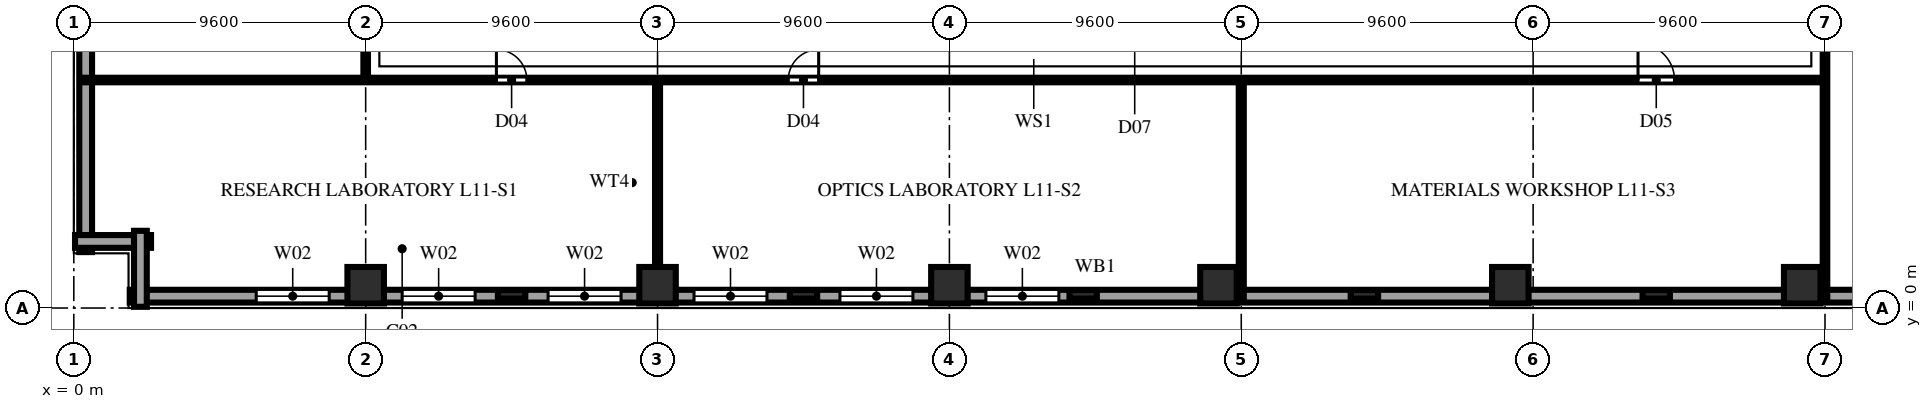
"""IFC4 building model, lengths in metres.
Left out: names, types, materials, properties, quantities, classifications, styles, units other than length and angle.
Written with IfcOpenShell. Run it as: python <this file> out.ifc"""

import sys

from ifc_helpers import new_model, si_unit, direction, frame, frame_2d, origin, origin_2d, place, context, subcontext, project, spatial, rectangle, extrude, element, fill, save


model = new_model("IFC4")
c1 = context("Model", 3, precision=1e-05, world=origin(), true_north=direction((0.0, 1.0)))
c2 = subcontext(c1, "Body", "Model", "MODEL_VIEW")
j1 = project(units=[si_unit("LENGTHUNIT", "METRE"), si_unit("PLANEANGLEUNIT", "RADIAN")], contexts=[c1])
p1 = place(None, origin())
s1 = spatial("IfcSite", under=j1, at=p1, CompositionType="ELEMENT")
p2 = place(p1, origin())
s2 = spatial("IfcBuilding", under=s1, at=p2, CompositionType="ELEMENT")
p3 = place(p2, frame((0.0, 0.0, 47.0)))
s3 = spatial("IfcBuildingStorey", under=s2, at=p3, CompositionType="ELEMENT", Elevation=47.0)
for number, where, z_axis, x_axis in (
    (1, (9.6, 0.75, 0.0), (0.0, 0.0, 1.0), (1.0, 0.0, 0.0)),
    (2, (19.2, 0.75, 0.0), (0.0, 0.0, 1.0), (1.0, 0.0, 0.0)),
    (3, (28.8, 0.75, 0.0), (0.0, 0.0, 1.0), (1.0, 0.0, 0.0)),
    (4, (37.65, 0.75, 0.0), (0.0, 0.0, 1.0), (1.0, 0.0, 0.0)),
    (5, (47.25, 0.75, 0.0), (0.0, 0.0, 1.0), (1.0, 0.0, 0.0)),
    (6, (56.85, 0.75, 0.0), (0.0, 0.0, 1.0), (1.0, 0.0, 0.0)),
):
    element("IfcColumn", number, at=place(p3, frame(where, z_axis=z_axis, x_axis=x_axis)), inside=s3, PredefinedType="COLUMN", context=c2, shape_type="SweptSolid", body=[
        extrude(rectangle(XDim=1.2, YDim=1.2, at=origin_2d()), origin(), (0.0, 0.0, 1.0), 3.8),
    ])
for number, where, z_axis, x_axis in (
    (7, (14.4, 0.45, 0.0), (0.0, 0.0, 1.0), (1.0, 0.0, 0.0)),
    (8, (24.0, 0.45, 0.0), (0.0, 0.0, 1.0), (1.0, 0.0, 0.0)),
    (9, (33.2, 0.45, 0.0), (0.0, 0.0, 1.0), (1.0, 0.0, 0.0)),
    (10, (42.45, 0.45, 0.0), (0.0, 0.0, 1.0), (1.0, 0.0, 0.0)),
    (11, (52.05, 0.45, 0.0), (0.0, 0.0, 1.0), (1.0, 0.0, 0.0)),
):
    element("IfcColumn", number, at=place(p3, frame(where, z_axis=z_axis, x_axis=x_axis)), inside=s3, PredefinedType="PILASTER", context=c2, shape_type="SweptSolid", body=[
        extrude(rectangle(XDim=0.9, YDim=0.28, at=origin_2d()), origin(), (0.0, 0.0, 1.0), 3.8),
    ])
p4 = place(p3, frame((1.84, 0.39, 0.0), z_axis=(0.0, 0.0, 1.0), x_axis=(1.0, 0.0, 0.0)))
e12 = element("IfcWall", 12, at=p4, inside=s3, PredefinedType="SOLIDWALL", context=c2, shape_type="SweptSolid", body=[
    extrude(rectangle(XDim=63.52, YDim=0.42, at=frame_2d((31.76, 0.0))), origin(), (0.0, 0.0, 1.0), 3.54),
])
p5 = place(p4, frame((4.16, 0.0, 0.85)))
e13 = element("IfcOpeningElement", 13, at=p5, cuts=e12, PredefinedType="OPENING", context=c2, shape_type="SweptSolid", body=[
    extrude(rectangle(XDim=2.4, YDim=1.85, at=frame_2d((1.2, 0.925))), frame((0.0, 0.222, 0.0), z_axis=(0.0, -1.0, 0.0), x_axis=(1.0, 0.0, 0.0)), (0.0, 0.0, 1.0), 0.444),
])
p6 = place(p4, frame((8.96, 0.0, 0.85)))
e14 = element("IfcOpeningElement", 14, at=p6, cuts=e12, PredefinedType="OPENING", context=c2, shape_type="SweptSolid", body=[
    extrude(rectangle(XDim=2.4, YDim=1.85, at=frame_2d((1.2, 0.925))), frame((0.0, 0.222, 0.0), z_axis=(0.0, -1.0, 0.0), x_axis=(1.0, 0.0, 0.0)), (0.0, 0.0, 1.0), 0.444),
])
p7 = place(p4, frame((13.76, 0.0, 0.85)))
e15 = element("IfcOpeningElement", 15, at=p7, cuts=e12, PredefinedType="OPENING", context=c2, shape_type="SweptSolid", body=[
    extrude(rectangle(XDim=2.4, YDim=1.85, at=frame_2d((1.2, 0.925))), frame((0.0, 0.222, 0.0), z_axis=(0.0, -1.0, 0.0), x_axis=(1.0, 0.0, 0.0)), (0.0, 0.0, 1.0), 0.444),
])
p8 = place(p4, frame((18.56, 0.0, 0.85)))
e16 = element("IfcOpeningElement", 16, at=p8, cuts=e12, PredefinedType="OPENING", context=c2, shape_type="SweptSolid", body=[
    extrude(rectangle(XDim=2.4, YDim=1.85, at=frame_2d((1.2, 0.925))), frame((0.0, 0.222, 0.0), z_axis=(0.0, -1.0, 0.0), x_axis=(1.0, 0.0, 0.0)), (0.0, 0.0, 1.0), 0.444),
])
p9 = place(p4, frame((23.36, 0.0, 0.85)))
e17 = element("IfcOpeningElement", 17, at=p9, cuts=e12, PredefinedType="OPENING", context=c2, shape_type="SweptSolid", body=[
    extrude(rectangle(XDim=2.4, YDim=1.85, at=frame_2d((1.2, 0.925))), frame((0.0, 0.222, 0.0), z_axis=(0.0, -1.0, 0.0), x_axis=(1.0, 0.0, 0.0)), (0.0, 0.0, 1.0), 0.444),
])
p10 = place(p4, frame((28.16, 0.0, 0.85)))
e18 = element("IfcOpeningElement", 18, at=p10, cuts=e12, PredefinedType="OPENING", context=c2, shape_type="SweptSolid", body=[
    extrude(rectangle(XDim=2.4, YDim=1.85, at=frame_2d((1.2, 0.925))), frame((0.0, 0.222, 0.0), z_axis=(0.0, -1.0, 0.0), x_axis=(1.0, 0.0, 0.0)), (0.0, 0.0, 1.0), 0.444),
])
p11 = place(p3, frame((0.39, 65.36, 0.0), z_axis=(0.0, 0.0, 1.0), x_axis=(0.0, -1.0, 0.0)))
e19 = element("IfcWall", 19, at=p11, inside=s3, PredefinedType="SOLIDWALL", context=c2, shape_type="SweptSolid", body=[
    extrude(rectangle(XDim=63.52, YDim=0.42, at=frame_2d((31.76, 0.0))), origin(), (0.0, 0.0, 1.0), 3.54),
])
p12 = place(p11, frame((4.885, 0.0, 0.9)))
e20 = element("IfcOpeningElement", 20, at=p12, cuts=e19, PredefinedType="OPENING", context=c2, shape_type="SweptSolid", body=[
    extrude(rectangle(XDim=0.95, YDim=1.85, at=frame_2d((0.475, 0.925))), frame((0.0, 0.222, 0.0), z_axis=(0.0, -1.0, 0.0), x_axis=(1.0, 0.0, 0.0)), (0.0, 0.0, 1.0), 0.444),
])
p13 = place(p11, frame((9.41, 0.0, 0.9)))
e21 = element("IfcOpeningElement", 21, at=p13, cuts=e19, PredefinedType="OPENING", context=c2, shape_type="SweptSolid", body=[
    extrude(rectangle(XDim=1.5, YDim=1.85, at=frame_2d((0.75, 0.925))), frame((0.0, 0.222, 0.0), z_axis=(0.0, -1.0, 0.0), x_axis=(1.0, 0.0, 0.0)), (0.0, 0.0, 1.0), 0.444),
])
p14 = place(p11, frame((14.485, 0.0, 0.9)))
e22 = element("IfcOpeningElement", 22, at=p14, cuts=e19, PredefinedType="OPENING", context=c2, shape_type="SweptSolid", body=[
    extrude(rectangle(XDim=0.95, YDim=1.85, at=frame_2d((0.475, 0.925))), frame((0.0, 0.222, 0.0), z_axis=(0.0, -1.0, 0.0), x_axis=(1.0, 0.0, 0.0)), (0.0, 0.0, 1.0), 0.444),
])
p15 = place(p11, frame((19.01, 0.0, 0.9)))
e23 = element("IfcOpeningElement", 23, at=p15, cuts=e19, PredefinedType="OPENING", context=c2, shape_type="SweptSolid", body=[
    extrude(rectangle(XDim=1.5, YDim=1.85, at=frame_2d((0.75, 0.925))), frame((0.0, 0.222, 0.0), z_axis=(0.0, -1.0, 0.0), x_axis=(1.0, 0.0, 0.0)), (0.0, 0.0, 1.0), 0.444),
])
p16 = place(p11, frame((24.085, 0.0, 0.9)))
e24 = element("IfcOpeningElement", 24, at=p16, cuts=e19, PredefinedType="OPENING", context=c2, shape_type="SweptSolid", body=[
    extrude(rectangle(XDim=0.95, YDim=1.85, at=frame_2d((0.475, 0.925))), frame((0.0, 0.222, 0.0), z_axis=(0.0, -1.0, 0.0), x_axis=(1.0, 0.0, 0.0)), (0.0, 0.0, 1.0), 0.444),
])
p17 = place(p11, frame((28.61, 0.0, 0.9)))
e25 = element("IfcOpeningElement", 25, at=p17, cuts=e19, PredefinedType="OPENING", context=c2, shape_type="SweptSolid", body=[
    extrude(rectangle(XDim=1.5, YDim=1.85, at=frame_2d((0.75, 0.925))), frame((0.0, 0.222, 0.0), z_axis=(0.0, -1.0, 0.0), x_axis=(1.0, 0.0, 0.0)), (0.0, 0.0, 1.0), 0.444),
])
p18 = place(p11, frame((33.685, 0.0, 0.9)))
e26 = element("IfcOpeningElement", 26, at=p18, cuts=e19, PredefinedType="OPENING", context=c2, shape_type="SweptSolid", body=[
    extrude(rectangle(XDim=0.95, YDim=1.85, at=frame_2d((0.475, 0.925))), frame((0.0, 0.222, 0.0), z_axis=(0.0, -1.0, 0.0), x_axis=(1.0, 0.0, 0.0)), (0.0, 0.0, 1.0), 0.444),
])
p19 = place(p11, frame((38.21, 0.0, 0.9)))
e27 = element("IfcOpeningElement", 27, at=p19, cuts=e19, PredefinedType="OPENING", context=c2, shape_type="SweptSolid", body=[
    extrude(rectangle(XDim=1.5, YDim=1.85, at=frame_2d((0.75, 0.925))), frame((0.0, 0.222, 0.0), z_axis=(0.0, -1.0, 0.0), x_axis=(1.0, 0.0, 0.0)), (0.0, 0.0, 1.0), 0.444),
])
p20 = place(p11, frame((43.285, 0.0, 0.9)))
e28 = element("IfcOpeningElement", 28, at=p20, cuts=e19, PredefinedType="OPENING", context=c2, shape_type="SweptSolid", body=[
    extrude(rectangle(XDim=0.95, YDim=1.85, at=frame_2d((0.475, 0.925))), frame((0.0, 0.222, 0.0), z_axis=(0.0, -1.0, 0.0), x_axis=(1.0, 0.0, 0.0)), (0.0, 0.0, 1.0), 0.444),
])
p21 = place(p11, frame((47.81, 0.0, 0.9)))
e29 = element("IfcOpeningElement", 29, at=p21, cuts=e19, PredefinedType="OPENING", context=c2, shape_type="SweptSolid", body=[
    extrude(rectangle(XDim=1.5, YDim=1.85, at=frame_2d((0.75, 0.925))), frame((0.0, 0.222, 0.0), z_axis=(0.0, -1.0, 0.0), x_axis=(1.0, 0.0, 0.0)), (0.0, 0.0, 1.0), 0.444),
])
p22 = place(p11, frame((52.885, 0.0, 0.9)))
e30 = element("IfcOpeningElement", 30, at=p22, cuts=e19, PredefinedType="OPENING", context=c2, shape_type="SweptSolid", body=[
    extrude(rectangle(XDim=0.95, YDim=1.85, at=frame_2d((0.475, 0.925))), frame((0.0, 0.222, 0.0), z_axis=(0.0, -1.0, 0.0), x_axis=(1.0, 0.0, 0.0)), (0.0, 0.0, 1.0), 0.444),
])
for number, where, z_axis, x_axis in (
    (31, (0.04, 2.19, 0.0), (0.0, 0.0, 1.0), (1.0, 0.0, 0.0)),
    (32, (2.19, 2.54, 0.0), (0.0, 0.0, 1.0), (0.0, -1.0, 0.0)),
):
    element("IfcWall", number, at=place(p3, frame(where, z_axis=z_axis, x_axis=x_axis)), inside=s3, PredefinedType="SOLIDWALL", context=c2, shape_type="SweptSolid", body=[
        extrude(rectangle(XDim=2.5, YDim=0.42, at=frame_2d((1.25, 0.0))), origin(), (0.0, 0.0, 1.0), 3.54),
    ])
p23 = place(p3, frame((9.6, 7.5, 0.0), z_axis=(0.0, 0.0, 1.0), x_axis=(0.0, 1.0, 0.0)))
e33 = element("IfcWall", 33, at=p23, inside=s3, PredefinedType="PARTITIONING", context=c2, shape_type="SweptSolid", body=[
    extrude(rectangle(XDim=2.1, YDim=0.15, at=frame_2d((1.05, 0.0))), origin(), (0.0, 0.0, 1.0), 3.184),
])
p24 = place(p3, frame((19.2, 0.22, 0.0), z_axis=(0.0, 0.0, 1.0), x_axis=(0.0, 1.0, 0.0)))
e34 = element("IfcWall", 34, at=p24, inside=s3, PredefinedType="PLUMBINGWALL", context=c2, shape_type="SweptSolid", body=[
    extrude(rectangle(XDim=0.53, YDim=0.165, at=frame_2d((0.265, 0.0))), origin(), (0.0, 0.0, 1.0), 3.54),
])
p25 = place(p3, frame((19.2, 0.75, 0.0), z_axis=(0.0, 0.0, 1.0), x_axis=(0.0, 1.0, 0.0)))
e35 = element("IfcWall", 35, at=p25, inside=s3, PredefinedType="PLUMBINGWALL", context=c2, shape_type="SweptSolid", body=[
    extrude(rectangle(XDim=6.75, YDim=0.165, at=frame_2d((3.375, 0.0))), origin(), (0.0, 0.0, 1.0), 3.184),
])
p26 = place(p3, frame((38.4, 0.22, 0.0), z_axis=(0.0, 0.0, 1.0), x_axis=(0.0, 1.0, 0.0)))
e36 = element("IfcWall", 36, at=p26, inside=s3, PredefinedType="PLUMBINGWALL", context=c2, shape_type="SweptSolid", body=[
    extrude(rectangle(XDim=7.28, YDim=0.165, at=frame_2d((3.64, 0.0))), origin(), (0.0, 0.0, 1.0), 3.54),
])
p27 = place(p3, frame((0.22, 7.5, 0.0), z_axis=(0.0, 0.0, 1.0), x_axis=(1.0, 0.0, 0.0)))
e37 = element("IfcWall", 37, at=p27, inside=s3, PredefinedType="PARTITIONING", context=c2, shape_type="SweptSolid", body=[
    extrude(rectangle(XDim=57.38, YDim=0.15, at=frame_2d((28.69, 0.0))), origin(), (0.0, 0.0, 1.0), 3.54),
])
p28 = place(p27, frame((13.68, 0.0, 0.0)))
e38 = element("IfcOpeningElement", 38, at=p28, cuts=e37, PredefinedType="OPENING", context=c2, shape_type="SweptSolid", body=[
    extrude(rectangle(XDim=1.0, YDim=2.2, at=frame_2d((0.5, 1.1))), frame((0.0, 0.087, 0.0), z_axis=(0.0, -1.0, 0.0), x_axis=(1.0, 0.0, 0.0)), (0.0, 0.0, 1.0), 0.174),
])
p29 = place(p27, frame((23.28, 0.0, 0.0)))
e39 = element("IfcOpeningElement", 39, at=p29, cuts=e37, PredefinedType="OPENING", context=c2, shape_type="SweptSolid", body=[
    extrude(rectangle(XDim=1.0, YDim=2.2, at=frame_2d((0.5, 1.1))), frame((0.0, 0.087, 0.0), z_axis=(0.0, -1.0, 0.0), x_axis=(1.0, 0.0, 0.0)), (0.0, 0.0, 1.0), 0.174),
])
p30 = place(p27, frame((51.23, 0.0, 0.0)))
e40 = element("IfcOpeningElement", 40, at=p30, cuts=e37, PredefinedType="OPENING", context=c2, shape_type="SweptSolid", body=[
    extrude(rectangle(XDim=1.2, YDim=2.2, at=frame_2d((0.6, 1.1))), frame((0.0, 0.087, 0.0), z_axis=(0.0, -1.0, 0.0), x_axis=(1.0, 0.0, 0.0)), (0.0, 0.0, 1.0), 0.174),
])
p31 = place(p3, frame((57.6, 0.22, 0.0), z_axis=(0.0, 0.0, 1.0), x_axis=(0.0, 1.0, 0.0)))
e41 = element("IfcWall", 41, at=p31, inside=s3, PredefinedType="PARTITIONING", context=c2, shape_type="SweptSolid", body=[
    extrude(rectangle(XDim=37.96, YDim=0.15, at=frame_2d((18.98, 0.0))), origin(), (0.0, 0.0, 1.0), 3.54),
])
p32 = place(p31, frame((23.33, 0.0, 0.0)))
e42 = element("IfcOpeningElement", 42, at=p32, cuts=e41, PredefinedType="OPENING", context=c2, shape_type="SweptSolid", body=[
    extrude(rectangle(XDim=1.0, YDim=2.2, at=frame_2d((0.5, 1.1))), frame((0.0, 0.087, 0.0), z_axis=(0.0, -1.0, 0.0), x_axis=(1.0, 0.0, 0.0)), (0.0, 0.0, 1.0), 0.174),
])
p33 = place(p5, origin())
e43 = element("IfcWindow", 43, at=p33, inside=s3, PartitioningType="TRIPLE_PANEL_VERTICAL", PredefinedType="WINDOW", context=c2, shape_type="SweptSolid", body=[
    extrude(rectangle(XDim=2.4, YDim=1.85, at=frame_2d((1.2, 0.925))), frame((0.0, 0.11, 0.0), z_axis=(0.0, -1.0, 0.0), x_axis=(1.0, 0.0, 0.0)), (0.0, 0.0, 1.0), 0.06),
])
fill(e13, e43)
p34 = place(p6, origin())
e44 = element("IfcWindow", 44, at=p34, inside=s3, PartitioningType="TRIPLE_PANEL_VERTICAL", PredefinedType="WINDOW", context=c2, shape_type="SweptSolid", body=[
    extrude(rectangle(XDim=2.4, YDim=1.85, at=frame_2d((1.2, 0.925))), frame((0.0, 0.11, 0.0), z_axis=(0.0, -1.0, 0.0), x_axis=(1.0, 0.0, 0.0)), (0.0, 0.0, 1.0), 0.06),
])
fill(e14, e44)
p35 = place(p7, origin())
e45 = element("IfcWindow", 45, at=p35, inside=s3, PartitioningType="TRIPLE_PANEL_VERTICAL", PredefinedType="WINDOW", context=c2, shape_type="SweptSolid", body=[
    extrude(rectangle(XDim=2.4, YDim=1.85, at=frame_2d((1.2, 0.925))), frame((0.0, 0.11, 0.0), z_axis=(0.0, -1.0, 0.0), x_axis=(1.0, 0.0, 0.0)), (0.0, 0.0, 1.0), 0.06),
])
fill(e15, e45)
p36 = place(p8, origin())
e46 = element("IfcWindow", 46, at=p36, inside=s3, PartitioningType="TRIPLE_PANEL_VERTICAL", PredefinedType="WINDOW", context=c2, shape_type="SweptSolid", body=[
    extrude(rectangle(XDim=2.4, YDim=1.85, at=frame_2d((1.2, 0.925))), frame((0.0, 0.11, 0.0), z_axis=(0.0, -1.0, 0.0), x_axis=(1.0, 0.0, 0.0)), (0.0, 0.0, 1.0), 0.06),
])
fill(e16, e46)
p37 = place(p9, origin())
e47 = element("IfcWindow", 47, at=p37, inside=s3, PartitioningType="TRIPLE_PANEL_VERTICAL", PredefinedType="WINDOW", context=c2, shape_type="SweptSolid", body=[
    extrude(rectangle(XDim=2.4, YDim=1.85, at=frame_2d((1.2, 0.925))), frame((0.0, 0.11, 0.0), z_axis=(0.0, -1.0, 0.0), x_axis=(1.0, 0.0, 0.0)), (0.0, 0.0, 1.0), 0.06),
])
fill(e17, e47)
p38 = place(p10, origin())
e48 = element("IfcWindow", 48, at=p38, inside=s3, PartitioningType="TRIPLE_PANEL_VERTICAL", PredefinedType="WINDOW", context=c2, shape_type="SweptSolid", body=[
    extrude(rectangle(XDim=2.4, YDim=1.85, at=frame_2d((1.2, 0.925))), frame((0.0, 0.11, 0.0), z_axis=(0.0, -1.0, 0.0), x_axis=(1.0, 0.0, 0.0)), (0.0, 0.0, 1.0), 0.06),
])
fill(e18, e48)
p39 = place(p28, origin())
e49 = element("IfcDoor", 49, at=p39, inside=s3, OperationType="SINGLE_SWING_LEFT", PredefinedType="DOOR", context=c2, shape_type="SweptSolid", body=[
    extrude(rectangle(XDim=1.0, YDim=2.2, at=frame_2d((0.5, 1.1))), frame((0.0, 0.025, 0.0), z_axis=(0.0, -1.0, 0.0), x_axis=(1.0, 0.0, 0.0)), (0.0, 0.0, 1.0), 0.05),
])
fill(e38, e49)
p40 = place(p29, origin())
e50 = element("IfcDoor", 50, at=p40, inside=s3, OperationType="SINGLE_SWING_RIGHT", PredefinedType="DOOR", context=c2, shape_type="SweptSolid", body=[
    extrude(rectangle(XDim=1.0, YDim=2.2, at=frame_2d((0.5, 1.1))), frame((0.0, 0.025, 0.0), z_axis=(0.0, -1.0, 0.0), x_axis=(1.0, 0.0, 0.0)), (0.0, 0.0, 1.0), 0.05),
])
fill(e39, e50)
p41 = place(p30, origin())
e51 = element("IfcDoor", 51, at=p41, inside=s3, OperationType="SINGLE_SWING_LEFT", PredefinedType="DOOR", context=c2, shape_type="SweptSolid", body=[
    extrude(rectangle(XDim=1.2, YDim=2.2, at=frame_2d((0.6, 1.1))), frame((0.0, 0.025, 0.0), z_axis=(0.0, -1.0, 0.0), x_axis=(1.0, 0.0, 0.0)), (0.0, 0.0, 1.0), 0.05),
])
fill(e40, e51)
save(model, sys.argv[1])
